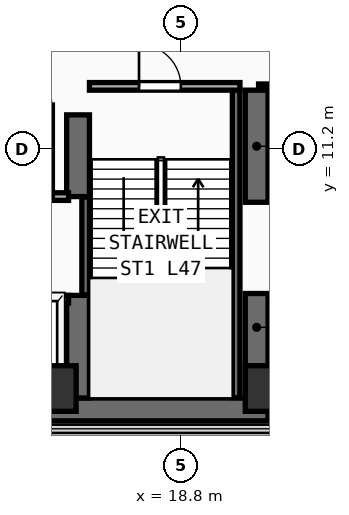
"""IFC4 building model, lengths in metres.
Left out: names, types, materials, properties, quantities, classifications, styles, units other than length and angle.
Written with IfcOpenShell. Run it as: python <this file> out.ifc"""

import sys

from ifc_helpers import new_model, si_unit, direction, frame, frame_2d, origin, origin_2d, place, context, subcontext, project, spatial, rectangle, extrude, element, fill, save


model = new_model("IFC4")
c1 = context("Model", 3, precision=1e-05, world=origin(), true_north=direction((0.0, 1.0)))
c2 = subcontext(c1, "Body", "Model", "MODEL_VIEW")
j1 = project(units=[si_unit("LENGTHUNIT", "METRE"), si_unit("PLANEANGLEUNIT", "RADIAN")], contexts=[c1])
p1 = place(None, origin())
s1 = spatial("IfcSite", under=j1, at=p1, CompositionType="ELEMENT")
p2 = place(p1, origin())
s2 = spatial("IfcBuilding", under=s1, at=p2, CompositionType="ELEMENT")
p3 = place(p2, frame((0.0, 0.0, 184.2)))
s3 = spatial("IfcBuildingStorey", under=s2, at=p3, CompositionType="ELEMENT", Elevation=184.2)
p4 = place(p3, frame((7.15, 4.35, 0.0), z_axis=(0.0, 0.0, 1.0), x_axis=(1.0, 0.0, 0.0)))
e1 = element("IfcWall", 1, at=p4, inside=s3, PredefinedType="SHEAR", context=c2, shape_type="SweptSolid", body=[
    extrude(rectangle(XDim=13.95, YDim=0.6, at=frame_2d((6.975, 0.0))), origin(), (0.0, 0.0, 1.0), 3.56),
])
p5 = place(p3, frame((20.8, 4.65, 0.0), z_axis=(0.0, 0.0, 1.0), x_axis=(0.0, 1.0, 0.0)))
e2 = element("IfcWall", 2, at=p5, inside=s3, PredefinedType="SHEAR", context=c2, shape_type="SweptSolid", body=[
    extrude(rectangle(XDim=2.75, YDim=0.6, at=frame_2d((1.375, 0.0))), origin(), (0.0, 0.0, 1.0), 3.56),
])
p6 = place(p3, frame((20.8, 9.8, 0.0), z_axis=(0.0, 0.0, 1.0), x_axis=(0.0, 1.0, 0.0)))
e3 = element("IfcWall", 3, at=p6, inside=s3, PredefinedType="SHEAR", context=c2, shape_type="SweptSolid", body=[
    extrude(rectangle(XDim=2.95, YDim=0.6, at=frame_2d((1.475, 0.0))), origin(), (0.0, 0.0, 1.0), 3.56),
])
p7 = place(p3, frame((16.1, 4.65, 0.0), z_axis=(0.0, 0.0, 1.0), x_axis=(0.0, 1.0, 0.0)))
e4 = element("IfcWall", 4, at=p7, inside=s3, PredefinedType="SHEAR", context=c2, shape_type="SweptSolid", body=[
    extrude(rectangle(XDim=2.7, YDim=0.6, at=frame_2d((1.35, 0.0))), origin(), (0.0, 0.0, 1.0), 3.56),
])
p8 = place(p3, frame((16.1, 9.95, 0.0), z_axis=(0.0, 0.0, 1.0), x_axis=(0.0, 1.0, 0.0)))
e5 = element("IfcWall", 5, at=p8, inside=s3, PredefinedType="SHEAR", context=c2, shape_type="SweptSolid", body=[
    extrude(rectangle(XDim=2.15, YDim=0.6, at=frame_2d((1.075, 0.0))), origin(), (0.0, 0.0, 1.0), 3.56),
])
for number, where, z_axis, x_axis in (
    (6, (15.45, 4.9, 0.0), (0.0, 0.0, 1.0), (1.0, 0.0, 0.0)),
    (7, (21.1, 4.9, 0.0), (0.0, 0.0, 1.0), (1.0, 0.0, 0.0)),
):
    element("IfcColumn", number, at=place(p3, frame(where, z_axis=z_axis, x_axis=x_axis)), inside=s3, PredefinedType="COLUMN", context=c2, shape_type="SweptSolid", body=[
        extrude(rectangle(XDim=1.2, YDim=1.2, at=origin_2d()), origin(), (0.0, 0.0, 1.0), 3.56),
    ])
p9 = place(p3, frame((16.3, 7.36, 0.0), z_axis=(0.0, 0.0, 1.0), x_axis=(0.0, 1.0, 0.0)))
e8 = element("IfcWall", 8, at=p9, inside=s3, PredefinedType="SHEAR", context=c2, shape_type="SweptSolid", body=[
    extrude(rectangle(XDim=2.58, YDim=0.2, at=frame_2d((1.29, 0.0))), origin(), (0.0, 0.0, 1.0), 3.56),
])
p10 = place(p3, frame((20.26, 4.66, 0.0), z_axis=(0.0, 0.0, 1.0), x_axis=(0.0, 1.0, 0.0)))
e9 = element("IfcWall", 9, at=p10, inside=s3, PredefinedType="SHEAR", context=c2, shape_type="SweptSolid", body=[
    extrude(rectangle(XDim=8.09, YDim=0.2, at=frame_2d((4.045, 0.0))), origin(), (0.0, 0.0, 1.0), 3.56),
])
p11 = place(p3, frame((16.4, 12.85, 0.0), z_axis=(0.0, 0.0, 1.0), x_axis=(1.0, 0.0, 0.0)))
e10 = element("IfcWall", 10, at=p11, inside=s3, PredefinedType="PARTITIONING", context=c2, shape_type="SweptSolid", body=[
    extrude(rectangle(XDim=3.96, YDim=0.2, at=frame_2d((1.98, 0.0))), origin(), (0.0, 0.0, 1.0), 3.56),
])
p12 = place(p11, frame((1.304, 0.0, 0.0)))
e11 = element("IfcOpeningElement", 11, at=p12, cuts=e10, PredefinedType="OPENING", context=c2, shape_type="SweptSolid", body=[
    extrude(rectangle(XDim=1.1, YDim=2.2, at=frame_2d((0.55, 1.1))), frame((0.0, 0.11, 0.0), z_axis=(0.0, -1.0, 0.0), x_axis=(1.0, 0.0, 0.0)), (0.0, 0.0, 1.0), 0.22),
])
p13 = place(p3, frame((7.5, 7.25, 0.0), z_axis=(0.0, 0.0, 1.0), x_axis=(1.0, 0.0, 0.0)))
e12 = element("IfcWall", 12, at=p13, inside=s3, PredefinedType="PARTITIONING", context=c2, shape_type="SweptSolid", body=[
    extrude(rectangle(XDim=8.35, YDim=0.2, at=frame_2d((4.175, 0.0))), origin(), (0.0, 0.0, 1.0), 3.56),
])
p14 = place(p13, frame((0.53, 0.0, 0.0)))
e13 = element("IfcOpeningElement", 13, at=p14, cuts=e12, PredefinedType="OPENING", context=c2, shape_type="SweptSolid", body=[
    extrude(rectangle(XDim=1.1, YDim=2.2, at=frame_2d((0.55, 1.1))), frame((0.0, 0.11, 0.0), z_axis=(0.0, -1.0, 0.0), x_axis=(1.0, 0.0, 0.0)), (0.0, 0.0, 1.0), 0.22),
])
p15 = place(p13, frame((2.37, 0.0, 0.0)))
e14 = element("IfcOpeningElement", 14, at=p15, cuts=e12, PredefinedType="OPENING", context=c2, shape_type="SweptSolid", body=[
    extrude(rectangle(XDim=1.1, YDim=2.2, at=frame_2d((0.55, 1.1))), frame((0.0, 0.11, 0.0), z_axis=(0.0, -1.0, 0.0), x_axis=(1.0, 0.0, 0.0)), (0.0, 0.0, 1.0), 0.22),
])
p16 = place(p13, frame((4.33, 0.0, 0.0)))
e15 = element("IfcOpeningElement", 15, at=p16, cuts=e12, PredefinedType="OPENING", context=c2, shape_type="SweptSolid", body=[
    extrude(rectangle(XDim=1.1, YDim=2.2, at=frame_2d((0.55, 1.1))), frame((0.0, 0.11, 0.0), z_axis=(0.0, -1.0, 0.0), x_axis=(1.0, 0.0, 0.0)), (0.0, 0.0, 1.0), 0.22),
])
p17 = place(p13, frame((6.5, 0.0, 0.0)))
e16 = element("IfcOpeningElement", 16, at=p17, cuts=e12, PredefinedType="OPENING", context=c2, shape_type="SweptSolid", body=[
    extrude(rectangle(XDim=1.1, YDim=2.2, at=frame_2d((0.55, 1.1))), frame((0.0, 0.11, 0.0), z_axis=(0.0, -1.0, 0.0), x_axis=(1.0, 0.0, 0.0)), (0.0, 0.0, 1.0), 0.22),
])
p18 = place(p3, frame((7.5, 9.95, 0.0), z_axis=(0.0, 0.0, 1.0), x_axis=(1.0, 0.0, 0.0)))
e17 = element("IfcWall", 17, at=p18, inside=s3, PredefinedType="PARTITIONING", context=c2, shape_type="SweptSolid", body=[
    extrude(rectangle(XDim=8.35, YDim=0.2, at=frame_2d((4.175, 0.0))), origin(), (0.0, 0.0, 1.0), 3.56),
])
p19 = place(p3, frame((15.35, 9.95, 0.0), z_axis=(0.0, 0.0, 1.0), x_axis=(0.0, 1.0, 0.0)))
e18 = element("IfcWall", 18, at=p19, inside=s3, PredefinedType="PARTITIONING", context=c2, shape_type="SweptSolid", body=[
    extrude(rectangle(XDim=2.41, YDim=0.15, at=frame_2d((1.205, 0.0))), origin(), (0.0, 0.0, 1.0), 3.56),
])
p20 = place(p3, frame((20.85, 12.85, 0.0), z_axis=(0.0, 0.0, 1.0), x_axis=(1.0, 0.0, 0.0)))
e19 = element("IfcWall", 19, at=p20, inside=s3, PredefinedType="PARTITIONING", context=c2, shape_type="SweptSolid", body=[
    extrude(rectangle(XDim=7.05, YDim=0.125, at=frame_2d((3.525, 0.0))), origin(), (0.0, 0.0, 1.0), 3.56),
])
p21 = place(p20, frame((2.8, 0.0, 0.0)))
e20 = element("IfcOpeningElement", 20, at=p21, cuts=e19, PredefinedType="OPENING", context=c2, shape_type="SweptSolid", body=[
    extrude(rectangle(XDim=0.95, YDim=2.15, at=frame_2d((0.475, 1.075))), frame((0.0, 0.073, 0.0), z_axis=(0.0, -1.0, 0.0), x_axis=(1.0, 0.0, 0.0)), (0.0, 0.0, 1.0), 0.145),
])
p22 = place(p12, frame((1.1, 0.0, 0.0), z_axis=(0.0, 0.0, 1.0), x_axis=(-1.0, 0.0, 0.0)))
e21 = element("IfcDoor", 21, at=p22, inside=s3, OperationType="SINGLE_SWING_RIGHT", PredefinedType="DOOR", context=c2, shape_type="SweptSolid", body=[
    extrude(rectangle(XDim=1.1, YDim=2.2, at=frame_2d((0.55, 1.1))), frame((0.0, 0.025, 0.0), z_axis=(0.0, -1.0, 0.0), x_axis=(1.0, 0.0, 0.0)), (0.0, 0.0, 1.0), 0.05),
])
fill(e11, e21)
save(model, sys.argv[1])
